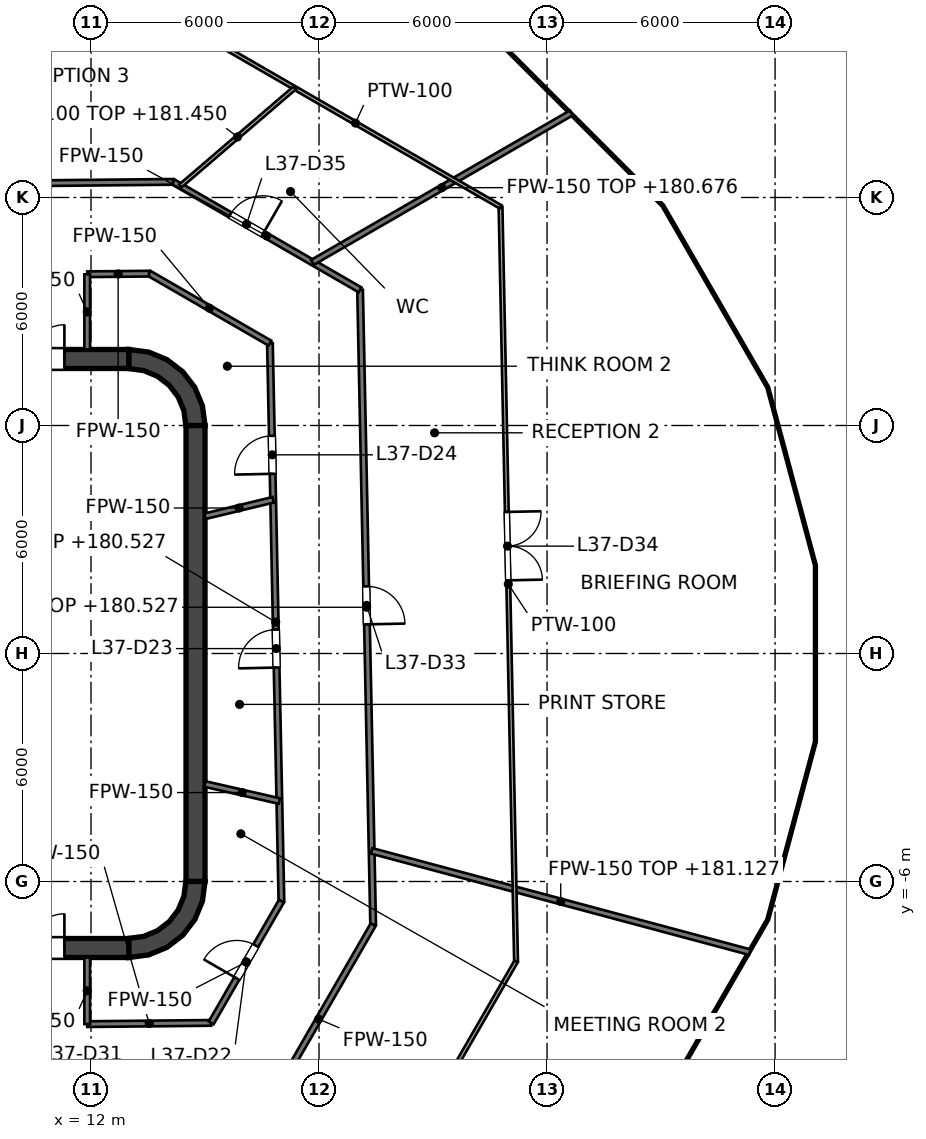
"""IFC4 building model, lengths in metres.
Left out: names, types, materials, properties, quantities, classifications, styles, units other than length and angle.
Written with IfcOpenShell. Run it as: python <this file> out.ifc"""

import sys

from ifc_helpers import new_model, si_unit, direction, frame, frame_2d, origin, place, context, subcontext, project, spatial, polyline, rectangle, outline, extrude, element, fill, save


model = new_model("IFC4")
c1 = context("Model", 3, precision=1e-05, world=origin(), true_north=direction((0.0, 1.0)))
c2 = subcontext(c1, "Body", "Model", "MODEL_VIEW")
j1 = project(units=[si_unit("LENGTHUNIT", "METRE"), si_unit("PLANEANGLEUNIT", "RADIAN")], contexts=[c1])
p1 = place(None, origin())
s1 = spatial("IfcSite", under=j1, at=p1, CompositionType="ELEMENT")
p2 = place(p1, origin())
s2 = spatial("IfcBuilding", under=s1, at=p2, CompositionType="ELEMENT")
p3 = place(p2, frame((0.0, 0.0, 177.6)))
s3 = spatial("IfcBuildingStorey", under=s2, at=p3, CompositionType="ELEMENT", Elevation=177.6)
p4 = place(p3, frame((-13.0, 7.75, 0.0), z_axis=(0.0, 0.0, 1.0), x_axis=(1.0, 0.0, 0.0)))
e1 = element("IfcWall", 1, at=p4, inside=s3, PredefinedType="SHEAR", context=c2, shape_type="SweptSolid", body=[
    extrude(rectangle(XDim=26.0, YDim=0.5, at=frame_2d((13.0, 0.0))), origin(), (0.0, 0.0, 1.0), 4.0),
])
p5 = place(p4, frame((1.7, 0.0, 0.0)))
e2 = element("IfcOpeningElement", 2, at=p5, cuts=e1, PredefinedType="OPENING", context=c2, shape_type="SweptSolid", body=[
    extrude(rectangle(XDim=1.8, YDim=2.1, at=frame_2d((0.9, 1.05))), frame((0.0, 0.25, 0.0), z_axis=(0.0, -1.0, 0.0), x_axis=(1.0, 0.0, 0.0)), (0.0, 0.0, 1.0), 0.5),
])
p6 = place(p4, frame((22.5, 0.0, 0.0)))
e3 = element("IfcOpeningElement", 3, at=p6, cuts=e1, PredefinedType="OPENING", context=c2, shape_type="SweptSolid", body=[
    extrude(rectangle(XDim=1.8, YDim=2.1, at=frame_2d((0.9, 1.05))), frame((0.0, 0.25, 0.0), z_axis=(0.0, -1.0, 0.0), x_axis=(1.0, 0.0, 0.0)), (0.0, 0.0, 1.0), 0.5),
])
p7 = place(p3, frame((-13.0, -7.75, 0.0), z_axis=(0.0, 0.0, 1.0), x_axis=(1.0, 0.0, 0.0)))
e4 = element("IfcWall", 4, at=p7, inside=s3, PredefinedType="SHEAR", context=c2, shape_type="SweptSolid", body=[
    extrude(rectangle(XDim=26.0, YDim=0.5, at=frame_2d((13.0, 0.0))), origin(), (0.0, 0.0, 1.0), 4.0),
])
p8 = place(p7, frame((1.7, 0.0, 0.0)))
e5 = element("IfcOpeningElement", 5, at=p8, cuts=e4, PredefinedType="OPENING", context=c2, shape_type="SweptSolid", body=[
    extrude(rectangle(XDim=1.8, YDim=2.1, at=frame_2d((0.9, 1.05))), frame((0.0, 0.25, 0.0), z_axis=(0.0, -1.0, 0.0), x_axis=(1.0, 0.0, 0.0)), (0.0, 0.0, 1.0), 0.5),
])
p9 = place(p7, frame((22.5, 0.0, 0.0)))
e6 = element("IfcOpeningElement", 6, at=p9, cuts=e4, PredefinedType="OPENING", context=c2, shape_type="SweptSolid", body=[
    extrude(rectangle(XDim=1.8, YDim=2.1, at=frame_2d((0.9, 1.05))), frame((0.0, 0.25, 0.0), z_axis=(0.0, -1.0, 0.0), x_axis=(1.0, 0.0, 0.0)), (0.0, 0.0, 1.0), 0.5),
])
p10 = place(p3, frame((14.75, -6.0, 0.0), z_axis=(0.0, 0.0, 1.0), x_axis=(0.0, 1.0, 0.0)))
e7 = element("IfcWall", 7, at=p10, inside=s3, PredefinedType="SHEAR", context=c2, shape_type="SweptSolid", body=[
    extrude(rectangle(XDim=12.0, YDim=0.5, at=frame_2d((6.0, 0.0))), origin(), (0.0, 0.0, 1.0), 4.0),
])
p11 = place(p3, origin())
e8 = element("IfcWall", 8, at=p11, inside=s3, PredefinedType="SHEAR", context=c2, shape_type="SweptSolid", body=[
    extrude(outline(polyline([(13.0, 8.0), (13.0, 7.496), (13.387, 7.445), (13.748, 7.295), (14.058, 7.058), (14.295, 6.748), (14.445, 6.387), (14.496, 6.0), (15.0, 6.0), (14.932, 6.518), (14.732, 7.0), (14.414, 7.414), (14.0, 7.732), (13.518, 7.932), (13.0, 8.0)])), origin(), (0.0, 0.0, 1.0), 4.0),
])
e9 = element("IfcWall", 9, at=p11, inside=s3, PredefinedType="SHEAR", context=c2, shape_type="SweptSolid", body=[
    extrude(outline(polyline([(15.0, -6.0), (14.496, -6.0), (14.445, -6.387), (14.295, -6.748), (14.058, -7.058), (13.748, -7.295), (13.387, -7.445), (13.0, -7.496), (13.0, -8.0), (13.518, -7.932), (14.0, -7.732), (14.414, -7.414), (14.732, -7.0), (14.932, -6.518), (15.0, -6.0)])), origin(), (0.0, 0.0, 1.0), 4.0),
])
p12 = place(p3, frame((11.8, -7.5, 0.0), z_axis=(0.0, 0.0, 1.0), x_axis=(0.0, 1.0, 0.0)))
e10 = element("IfcWall", 10, at=p12, inside=s3, PredefinedType="SOLIDWALL", context=c2, shape_type="SweptSolid", body=[
    extrude(rectangle(XDim=15.0, YDim=0.4, at=frame_2d((7.5, 0.0))), origin(), (0.0, 0.0, 1.0), 3.85),
])
p13 = place(p12, frame((11.3, 0.0, 0.0)))
e11 = element("IfcOpeningElement", 11, at=p13, cuts=e10, PredefinedType="OPENING", context=c2, shape_type="SweptSolid", body=[
    extrude(rectangle(XDim=1.1, YDim=2.1, at=frame_2d((0.55, 1.05))), frame((0.0, 0.2, 0.0), z_axis=(0.0, -1.0, 0.0), x_axis=(1.0, 0.0, 0.0)), (0.0, 0.0, 1.0), 0.4),
])
p14 = place(p12, frame((8.4, 0.0, 0.0)))
e12 = element("IfcOpeningElement", 12, at=p14, cuts=e10, PredefinedType="OPENING", context=c2, shape_type="SweptSolid", body=[
    extrude(rectangle(XDim=1.1, YDim=2.1, at=frame_2d((0.55, 1.05))), frame((0.0, 0.2, 0.0), z_axis=(0.0, -1.0, 0.0), x_axis=(1.0, 0.0, 0.0)), (0.0, 0.0, 1.0), 0.4),
])
p15 = place(p12, frame((5.5, 0.0, 0.0)))
e13 = element("IfcOpeningElement", 13, at=p15, cuts=e10, PredefinedType="OPENING", context=c2, shape_type="SweptSolid", body=[
    extrude(rectangle(XDim=1.1, YDim=2.1, at=frame_2d((0.55, 1.05))), frame((0.0, 0.2, 0.0), z_axis=(0.0, -1.0, 0.0), x_axis=(1.0, 0.0, 0.0)), (0.0, 0.0, 1.0), 0.4),
])
p16 = place(p12, frame((13.697, 0.0, 0.0)))
e14 = element("IfcOpeningElement", 14, at=p16, cuts=e10, PredefinedType="OPENING", context=c2, shape_type="SweptSolid", body=[
    extrude(rectangle(XDim=0.9, YDim=2.1, at=frame_2d((0.45, 1.05))), frame((0.0, 0.2, 0.0), z_axis=(0.0, -1.0, 0.0), x_axis=(1.0, 0.0, 0.0)), (0.0, 0.0, 1.0), 0.4),
])
p17 = place(p12, frame((0.403, 0.0, 0.0)))
e15 = element("IfcOpeningElement", 15, at=p17, cuts=e10, PredefinedType="OPENING", context=c2, shape_type="SweptSolid", body=[
    extrude(rectangle(XDim=0.9, YDim=2.1, at=frame_2d((0.45, 1.05))), frame((0.0, 0.2, 0.0), z_axis=(0.0, -1.0, 0.0), x_axis=(1.0, 0.0, 0.0)), (0.0, 0.0, 1.0), 0.4),
])
e16 = element("IfcWall", 16, at=p11, inside=s3, PredefinedType="SOLIDWALL", context=c2, shape_type="SweptSolid", body=[
    extrude(outline(polyline([(12.0, -5.675), (12.0, -5.925), (14.25, -5.925), (14.5, -5.925), (14.5, -5.675), (14.5, -3.025), (14.5, -2.775), (14.5, -0.125), (14.5, 0.125), (14.5, 2.775), (14.5, 3.025), (14.5, 5.675), (14.5, 5.925), (14.25, 5.925), (12.0, 5.925), (12.0, 5.675), (14.25, 5.675), (14.25, 3.025), (12.0, 3.025), (12.0, 2.775), (14.25, 2.775), (14.25, 0.125), (12.0, 0.125), (12.0, -0.125), (14.25, -0.125), (14.25, -2.775), (12.0, -2.775), (12.0, -3.025), (14.25, -3.025), (14.25, -5.675), (12.0, -5.675)])), origin(), (0.0, 0.0, 1.0), 3.85),
])
p18 = place(p3, frame((16.708, 8.168, 0.0), z_axis=(0.0, 0.0, 1.0), x_axis=(0.020594135175, -0.999787918309, 0.0)))
e17 = element("IfcWall", 17, at=p18, inside=s3, PredefinedType="PARTITIONING", context=c2, shape_type="SweptSolid", body=[
    extrude(rectangle(XDim=14.688, YDim=0.15, at=frame_2d((7.344, 0.0))), origin(), (0.0, 0.0, 1.0), 2.927),
])
p19 = place(p18, frame((7.54, 0.0, 0.0)))
e18 = element("IfcOpeningElement", 18, at=p19, cuts=e17, PredefinedType="OPENING", context=c2, shape_type="SweptSolid", body=[
    extrude(rectangle(XDim=1.0, YDim=2.1, at=frame_2d((0.5, 1.05))), frame((0.0, 0.075, 0.0), z_axis=(0.0, -1.0, 0.0), x_axis=(1.0, 0.0, 0.0)), (0.0, 0.0, 1.0), 0.15),
])
p20 = place(p18, frame((2.44, 0.0, 0.0)))
e19 = element("IfcOpeningElement", 19, at=p20, cuts=e17, PredefinedType="OPENING", context=c2, shape_type="SweptSolid", body=[
    extrude(rectangle(XDim=1.0, YDim=2.1, at=frame_2d((0.5, 1.05))), frame((0.0, 0.075, 0.0), z_axis=(0.0, -1.0, 0.0), x_axis=(1.0, 0.0, 0.0)), (0.0, 0.0, 1.0), 0.15),
])
p21 = place(p3, frame((19.08, 9.57, 0.0), z_axis=(0.0, 0.0, 1.0), x_axis=(0.020585419538, -0.9997880978, 0.0)))
e20 = element("IfcWall", 20, at=p21, inside=s3, PredefinedType="PARTITIONING", context=c2, shape_type="SweptSolid", body=[
    extrude(rectangle(XDim=16.711, YDim=0.15, at=frame_2d((8.355, 0.0))), origin(), (0.0, 0.0, 1.0), 2.927),
])
p22 = place(p21, frame((7.805, 0.0, 0.0)))
e21 = element("IfcOpeningElement", 21, at=p22, cuts=e20, PredefinedType="OPENING", context=c2, shape_type="SweptSolid", body=[
    extrude(rectangle(XDim=1.0, YDim=2.1, at=frame_2d((0.5, 1.05))), frame((0.0, 0.075, 0.0), z_axis=(0.0, -1.0, 0.0), x_axis=(1.0, 0.0, 0.0)), (0.0, 0.0, 1.0), 0.15),
])
p23 = place(p3, frame((13.527, 10.005, 0.0), z_axis=(0.0, 0.0, 1.0), x_axis=(0.865856755607, -0.50029199351, 0.0)))
e22 = element("IfcWall", 22, at=p23, inside=s3, PredefinedType="PARTITIONING", context=c2, shape_type="SweptSolid", body=[
    extrude(rectangle(XDim=3.673, YDim=0.15, at=frame_2d((1.836, 0.0))), origin(), (0.0, 0.0, 1.0), 2.995),
])
p24 = place(p3, frame((14.159, 12.412, 0.0), z_axis=(0.0, 0.0, 1.0), x_axis=(0.865837777906, -0.500324836831, 0.0)))
e23 = element("IfcWall", 23, at=p24, inside=s3, PredefinedType="PARTITIONING", context=c2, shape_type="SweptSolid", body=[
    extrude(rectangle(XDim=5.683, YDim=0.15, at=frame_2d((2.841, 0.0))), origin(), (0.0, 0.0, 1.0), 2.995),
])
p25 = place(p24, frame((1.733, 0.0, 0.0)))
e24 = element("IfcOpeningElement", 24, at=p25, cuts=e23, PredefinedType="OPENING", context=c2, shape_type="SweptSolid", body=[
    extrude(rectangle(XDim=1.0, YDim=2.1, at=frame_2d((0.5, 1.05))), frame((0.0, 0.075, 0.0), z_axis=(0.0, -1.0, 0.0), x_axis=(1.0, 0.0, 0.0)), (0.0, 0.0, 1.0), 0.15),
])
p26 = place(p3, frame((19.384, -5.194, 0.0), z_axis=(0.0, 0.0, 1.0), x_axis=(0.965946042089, -0.258743586919, 0.0)))
e25 = element("IfcWall", 25, at=p26, inside=s3, PredefinedType="PARTITIONING", context=c2, shape_type="SweptSolid", body=[
    extrude(rectangle(XDim=10.303, YDim=0.15, at=frame_2d((5.151, 0.0))), origin(), (0.0, 0.0, 1.0), 3.527),
])
p27 = place(p3, frame((15.0, -3.435, 0.0), z_axis=(0.0, 0.0, 1.0), x_axis=(0.974785245705, -0.223145075582, 0.0)))
e26 = element("IfcWall", 26, at=p27, inside=s3, PredefinedType="PARTITIONING", context=c2, shape_type="SweptSolid", body=[
    extrude(rectangle(XDim=2.008, YDim=0.15, at=frame_2d((1.004, 0.0))), origin(), (0.0, 0.0, 1.0), 2.995),
])
p28 = place(p3, frame((11.9, -9.753, 0.0), z_axis=(0.0, 0.0, 1.0), x_axis=(0.999951172082, 0.009881976096, 0.0)))
e27 = element("IfcWall", 27, at=p28, inside=s3, PredefinedType="PARTITIONING", context=c2, shape_type="SweptSolid", body=[
    extrude(rectangle(XDim=3.261, YDim=0.15, at=frame_2d((1.631, 0.0))), origin(), (0.0, 0.0, 1.0), 2.995),
])
p29 = place(p3, frame((11.9, 9.98, 0.0), z_axis=(0.0, 0.0, 1.0), x_axis=(0.999950974094, 0.009901990141, 0.0)))
e28 = element("IfcWall", 28, at=p29, inside=s3, PredefinedType="PARTITIONING", context=c2, shape_type="SweptSolid", body=[
    extrude(rectangle(XDim=1.627, YDim=0.15, at=frame_2d((0.813, 0.0))), origin(), (0.0, 0.0, 1.0), 2.995),
])
p30 = place(p3, frame((-16.555, 12.107, 0.0), z_axis=(0.0, 0.0, 1.0), x_axis=(0.999951034758, 0.009895862121, 0.0)))
e29 = element("IfcWall", 29, at=p30, inside=s3, PredefinedType="PARTITIONING", context=c2, shape_type="SweptSolid", body=[
    extrude(rectangle(XDim=30.715, YDim=0.15, at=frame_2d((15.358, 0.0))), origin(), (0.0, 0.0, 1.0), 2.927),
])
p31 = place(p30, frame((20.689, 0.0, 0.0)))
e30 = element("IfcOpeningElement", 30, at=p31, cuts=e29, PredefinedType="OPENING", context=c2, shape_type="SweptSolid", body=[
    extrude(rectangle(XDim=1.0, YDim=2.1, at=frame_2d((0.5, 1.05))), frame((0.0, 0.075, 0.0), z_axis=(0.0, -1.0, 0.0), x_axis=(1.0, 0.0, 0.0)), (0.0, 0.0, 1.0), 0.15),
])
p32 = place(p30, frame((14.115, 0.0, 0.0)))
e31 = element("IfcOpeningElement", 31, at=p32, cuts=e29, PredefinedType="OPENING", context=c2, shape_type="SweptSolid", body=[
    extrude(rectangle(XDim=1.0, YDim=2.1, at=frame_2d((0.5, 1.05))), frame((0.0, 0.075, 0.0), z_axis=(0.0, -1.0, 0.0), x_axis=(1.0, 0.0, 0.0)), (0.0, 0.0, 1.0), 0.15),
])
p33 = place(p30, frame((10.638, 0.0, 0.0)))
e32 = element("IfcOpeningElement", 32, at=p33, cuts=e29, PredefinedType="OPENING", context=c2, shape_type="SweptSolid", body=[
    extrude(rectangle(XDim=1.0, YDim=2.1, at=frame_2d((0.5, 1.05))), frame((0.0, 0.075, 0.0), z_axis=(0.0, -1.0, 0.0), x_axis=(1.0, 0.0, 0.0)), (0.0, 0.0, 1.0), 0.15),
])
p34 = place(p30, frame((5.176, 0.0, 0.0)))
e33 = element("IfcOpeningElement", 33, at=p34, cuts=e29, PredefinedType="OPENING", context=c2, shape_type="SweptSolid", body=[
    extrude(rectangle(XDim=1.0, YDim=2.1, at=frame_2d((0.5, 1.05))), frame((0.0, 0.075, 0.0), z_axis=(0.0, -1.0, 0.0), x_axis=(1.0, 0.0, 0.0)), (0.0, 0.0, 1.0), 0.15),
])
p35 = place(p3, frame((15.0, 3.612, 0.0), z_axis=(0.0, 0.0, 1.0), x_axis=(0.972133200519, 0.234429180027, 0.0)))
e34 = element("IfcWall", 34, at=p35, inside=s3, PredefinedType="PARTITIONING", context=c2, shape_type="SweptSolid", body=[
    extrude(rectangle(XDim=1.844, YDim=0.15, at=frame_2d((0.922, 0.0))), origin(), (0.0, 0.0, 1.0), 2.995),
])
p36 = place(p3, frame((17.828, 10.293, 0.0), z_axis=(0.0, 0.0, 1.0), x_axis=(0.866042869649, 0.499969747014, 0.0)))
e35 = element("IfcWall", 35, at=p36, inside=s3, PredefinedType="PARTITIONING", context=c2, shape_type="SweptSolid", body=[
    extrude(rectangle(XDim=7.862, YDim=0.15, at=frame_2d((3.931, 0.0))), origin(), (0.0, 0.0, 1.0), 3.076),
])
p37 = place(p3, frame((16.555, -12.107, 0.0), z_axis=(0.0, 0.0, 1.0), x_axis=(0.500014611105, 0.866016967894, 0.0)))
e36 = element("IfcWall", 36, at=p37, inside=s3, PredefinedType="PARTITIONING", context=c2, shape_type="SweptSolid", body=[
    extrude(rectangle(XDim=5.739, YDim=0.15, at=frame_2d((2.869, 0.0))), origin(), (0.0, 0.0, 1.0), 2.995),
])
p38 = place(p3, frame((15.161, -9.721, 0.0), z_axis=(0.0, 0.0, 1.0), x_axis=(0.500042316284, 0.866000971088, 0.0)))
e37 = element("IfcWall", 37, at=p38, inside=s3, PredefinedType="PARTITIONING", context=c2, shape_type="SweptSolid", body=[
    extrude(rectangle(XDim=3.7, YDim=0.15, at=frame_2d((1.85, 0.0))), origin(), (0.0, 0.0, 1.0), 2.995),
])
p39 = place(p38, frame((1.351, 0.0, 0.0)))
e38 = element("IfcOpeningElement", 38, at=p39, cuts=e37, PredefinedType="OPENING", context=c2, shape_type="SweptSolid", body=[
    extrude(rectangle(XDim=1.0, YDim=2.1, at=frame_2d((0.5, 1.05))), frame((0.0, 0.075, 0.0), z_axis=(0.0, -1.0, 0.0), x_axis=(1.0, 0.0, 0.0)), (0.0, 0.0, 1.0), 0.15),
])
p40 = place(p3, frame((11.9, -9.753, 0.0), z_axis=(0.0, 0.0, 1.0), x_axis=(0.0, 1.0, 0.0)))
e39 = element("IfcWall", 39, at=p40, inside=s3, PredefinedType="PARTITIONING", context=c2, shape_type="SweptSolid", body=[
    extrude(rectangle(XDim=1.753, YDim=0.15, at=frame_2d((0.876, 0.0))), origin(), (0.0, 0.0, 1.0), 2.995),
])
p41 = place(p3, frame((11.9, 8.0, 0.0), z_axis=(0.0, 0.0, 1.0), x_axis=(0.0, 1.0, 0.0)))
e40 = element("IfcWall", 40, at=p41, inside=s3, PredefinedType="PARTITIONING", context=c2, shape_type="SweptSolid", body=[
    extrude(rectangle(XDim=1.978, YDim=0.15, at=frame_2d((0.989, 0.0))), origin(), (0.0, 0.0, 1.0), 2.995),
])
p42 = place(p3, frame((22.776, 11.754, 0.0), z_axis=(0.0, 0.0, 1.0), x_axis=(0.020565153385, -0.99978851487, 0.0)))
e41 = element("IfcWall", 41, at=p42, inside=s3, PredefinedType="PARTITIONING", context=c2, shape_type="SweptSolid", body=[
    extrude(rectangle(XDim=19.861, YDim=0.1, at=frame_2d((9.931, 0.0))), origin(), (0.0, 0.0, 1.0), 2.927),
])
p43 = place(p42, frame((8.031, 0.0, 0.0)))
e42 = element("IfcOpeningElement", 42, at=p43, cuts=e41, PredefinedType="OPENING", context=c2, shape_type="SweptSolid", body=[
    extrude(rectangle(XDim=1.8, YDim=2.1, at=frame_2d((0.9, 1.05))), frame((0.0, 0.05, 0.0), z_axis=(0.0, -1.0, 0.0), x_axis=(1.0, 0.0, 0.0)), (0.0, 0.0, 1.0), 0.1),
])
p44 = place(p3, frame((15.144, 16.162, 0.0), z_axis=(0.0, 0.0, 1.0), x_axis=(0.865929062236, -0.500166831342, 0.0)))
e43 = element("IfcWall", 43, at=p44, inside=s3, PredefinedType="PARTITIONING", context=c2, shape_type="SweptSolid", body=[
    extrude(rectangle(XDim=8.813, YDim=0.1, at=frame_2d((4.407, 0.0))), origin(), (0.0, 0.0, 1.0), 2.927),
])
p45 = place(p3, frame((14.349, 12.302, 0.0), z_axis=(0.0, 0.0, 1.0), x_axis=(0.759100106755, 0.650973907253, 0.0)))
e44 = element("IfcWall", 44, at=p45, inside=s3, PredefinedType="PARTITIONING", context=c2, shape_type="SweptSolid", body=[
    extrude(rectangle(XDim=3.965, YDim=0.1, at=frame_2d((1.982, 0.0))), origin(), (0.0, 0.0, 1.0), 3.85),
])
p46 = place(p3, frame((18.727, -15.826, 0.0), z_axis=(0.0, 0.0, 1.0), x_axis=(0.499931804057, 0.866064773151, 0.0)))
e45 = element("IfcWall", 45, at=p46, inside=s3, PredefinedType="PARTITIONING", context=c2, shape_type="SweptSolid", body=[
    extrude(rectangle(XDim=8.917, YDim=0.1, at=frame_2d((4.458, 0.0))), origin(), (0.0, 0.0, 1.0), 2.995),
])
p47 = place(p13, origin())
e46 = element("IfcDoor", 46, at=p47, inside=s3, OperationType="DOUBLE_DOOR_SLIDING", PredefinedType="DOOR", context=c2, shape_type="SweptSolid", body=[
    extrude(rectangle(XDim=1.1, YDim=2.1, at=frame_2d((0.55, 1.05))), frame((0.0, 0.025, 0.0), z_axis=(0.0, -1.0, 0.0), x_axis=(1.0, 0.0, 0.0)), (0.0, 0.0, 1.0), 0.05),
])
fill(e11, e46)
p48 = place(p14, origin())
e47 = element("IfcDoor", 47, at=p48, inside=s3, OperationType="DOUBLE_DOOR_SLIDING", PredefinedType="DOOR", context=c2, shape_type="SweptSolid", body=[
    extrude(rectangle(XDim=1.1, YDim=2.1, at=frame_2d((0.55, 1.05))), frame((0.0, 0.025, 0.0), z_axis=(0.0, -1.0, 0.0), x_axis=(1.0, 0.0, 0.0)), (0.0, 0.0, 1.0), 0.05),
])
fill(e12, e47)
p49 = place(p15, origin())
e48 = element("IfcDoor", 48, at=p49, inside=s3, OperationType="DOUBLE_DOOR_SLIDING", PredefinedType="DOOR", context=c2, shape_type="SweptSolid", body=[
    extrude(rectangle(XDim=1.1, YDim=2.1, at=frame_2d((0.55, 1.05))), frame((0.0, 0.025, 0.0), z_axis=(0.0, -1.0, 0.0), x_axis=(1.0, 0.0, 0.0)), (0.0, 0.0, 1.0), 0.05),
])
fill(e13, e48)
p50 = place(p16, origin())
e49 = element("IfcDoor", 49, at=p50, inside=s3, OperationType="SINGLE_SWING_RIGHT", PredefinedType="DOOR", context=c2, shape_type="SweptSolid", body=[
    extrude(rectangle(XDim=0.9, YDim=2.1, at=frame_2d((0.45, 1.05))), frame((0.0, 0.025, 0.0), z_axis=(0.0, -1.0, 0.0), x_axis=(1.0, 0.0, 0.0)), (0.0, 0.0, 1.0), 0.05),
])
fill(e14, e49)
p51 = place(p17, origin())
e50 = element("IfcDoor", 50, at=p51, inside=s3, OperationType="SINGLE_SWING_RIGHT", PredefinedType="DOOR", context=c2, shape_type="SweptSolid", body=[
    extrude(rectangle(XDim=0.9, YDim=2.1, at=frame_2d((0.45, 1.05))), frame((0.0, 0.025, 0.0), z_axis=(0.0, -1.0, 0.0), x_axis=(1.0, 0.0, 0.0)), (0.0, 0.0, 1.0), 0.05),
])
fill(e15, e50)
p52 = place(p6, origin())
e51 = element("IfcDoor", 51, at=p52, inside=s3, OperationType="DOUBLE_DOOR_SINGLE_SWING", PredefinedType="DOOR", context=c2, shape_type="SweptSolid", body=[
    extrude(rectangle(XDim=1.8, YDim=2.1, at=frame_2d((0.9, 1.05))), frame((0.0, 0.025, 0.0), z_axis=(0.0, -1.0, 0.0), x_axis=(1.0, 0.0, 0.0)), (0.0, 0.0, 1.0), 0.05),
])
fill(e3, e51)
p53 = place(p9, origin())
e52 = element("IfcDoor", 52, at=p53, inside=s3, OperationType="DOUBLE_DOOR_SINGLE_SWING", PredefinedType="DOOR", context=c2, shape_type="SweptSolid", body=[
    extrude(rectangle(XDim=1.8, YDim=2.1, at=frame_2d((0.9, 1.05))), frame((0.0, 0.025, 0.0), z_axis=(0.0, -1.0, 0.0), x_axis=(1.0, 0.0, 0.0)), (0.0, 0.0, 1.0), 0.05),
])
fill(e6, e52)
p54 = place(p39, origin())
e53 = element("IfcDoor", 53, at=p54, inside=s3, OperationType="SINGLE_SWING_LEFT", PredefinedType="DOOR", context=c2, shape_type="SweptSolid", body=[
    extrude(rectangle(XDim=1.0, YDim=2.1, at=frame_2d((0.5, 1.05))), frame((0.0, 0.025, 0.0), z_axis=(0.0, -1.0, 0.0), x_axis=(1.0, 0.0, 0.0)), (0.0, 0.0, 1.0), 0.05),
])
fill(e38, e53)
p55 = place(p19, origin())
e54 = element("IfcDoor", 54, at=p55, inside=s3, OperationType="SINGLE_SWING_RIGHT", PredefinedType="DOOR", context=c2, shape_type="SweptSolid", body=[
    extrude(rectangle(XDim=1.0, YDim=2.1, at=frame_2d((0.5, 1.05))), frame((0.0, 0.025, 0.0), z_axis=(0.0, -1.0, 0.0), x_axis=(1.0, 0.0, 0.0)), (0.0, 0.0, 1.0), 0.05),
])
fill(e18, e54)
p56 = place(p20, origin())
e55 = element("IfcDoor", 55, at=p56, inside=s3, OperationType="SINGLE_SWING_RIGHT", PredefinedType="DOOR", context=c2, shape_type="SweptSolid", body=[
    extrude(rectangle(XDim=1.0, YDim=2.1, at=frame_2d((0.5, 1.05))), frame((0.0, 0.025, 0.0), z_axis=(0.0, -1.0, 0.0), x_axis=(1.0, 0.0, 0.0)), (0.0, 0.0, 1.0), 0.05),
])
fill(e19, e55)
p57 = place(p22, origin())
e56 = element("IfcDoor", 56, at=p57, inside=s3, OperationType="SINGLE_SWING_RIGHT", PredefinedType="DOOR", context=c2, shape_type="SweptSolid", body=[
    extrude(rectangle(XDim=1.0, YDim=2.1, at=frame_2d((0.5, 1.05))), frame((0.0, 0.025, 0.0), z_axis=(0.0, -1.0, 0.0), x_axis=(1.0, 0.0, 0.0)), (0.0, 0.0, 1.0), 0.05),
])
fill(e21, e56)
p58 = place(p43, origin())
e57 = element("IfcDoor", 57, at=p58, inside=s3, OperationType="DOUBLE_DOOR_SINGLE_SWING", PredefinedType="DOOR", context=c2, shape_type="SweptSolid", body=[
    extrude(rectangle(XDim=1.8, YDim=2.1, at=frame_2d((0.9, 1.05))), frame((0.0, 0.025, 0.0), z_axis=(0.0, -1.0, 0.0), x_axis=(1.0, 0.0, 0.0)), (0.0, 0.0, 1.0), 0.05),
])
fill(e42, e57)
p59 = place(p25, origin())
e58 = element("IfcDoor", 58, at=p59, inside=s3, OperationType="SINGLE_SWING_RIGHT", PredefinedType="DOOR", context=c2, shape_type="SweptSolid", body=[
    extrude(rectangle(XDim=1.0, YDim=2.1, at=frame_2d((0.5, 1.05))), frame((0.0, 0.025, 0.0), z_axis=(0.0, -1.0, 0.0), x_axis=(1.0, 0.0, 0.0)), (0.0, 0.0, 1.0), 0.05),
])
fill(e24, e58)
save(model, sys.argv[1])
